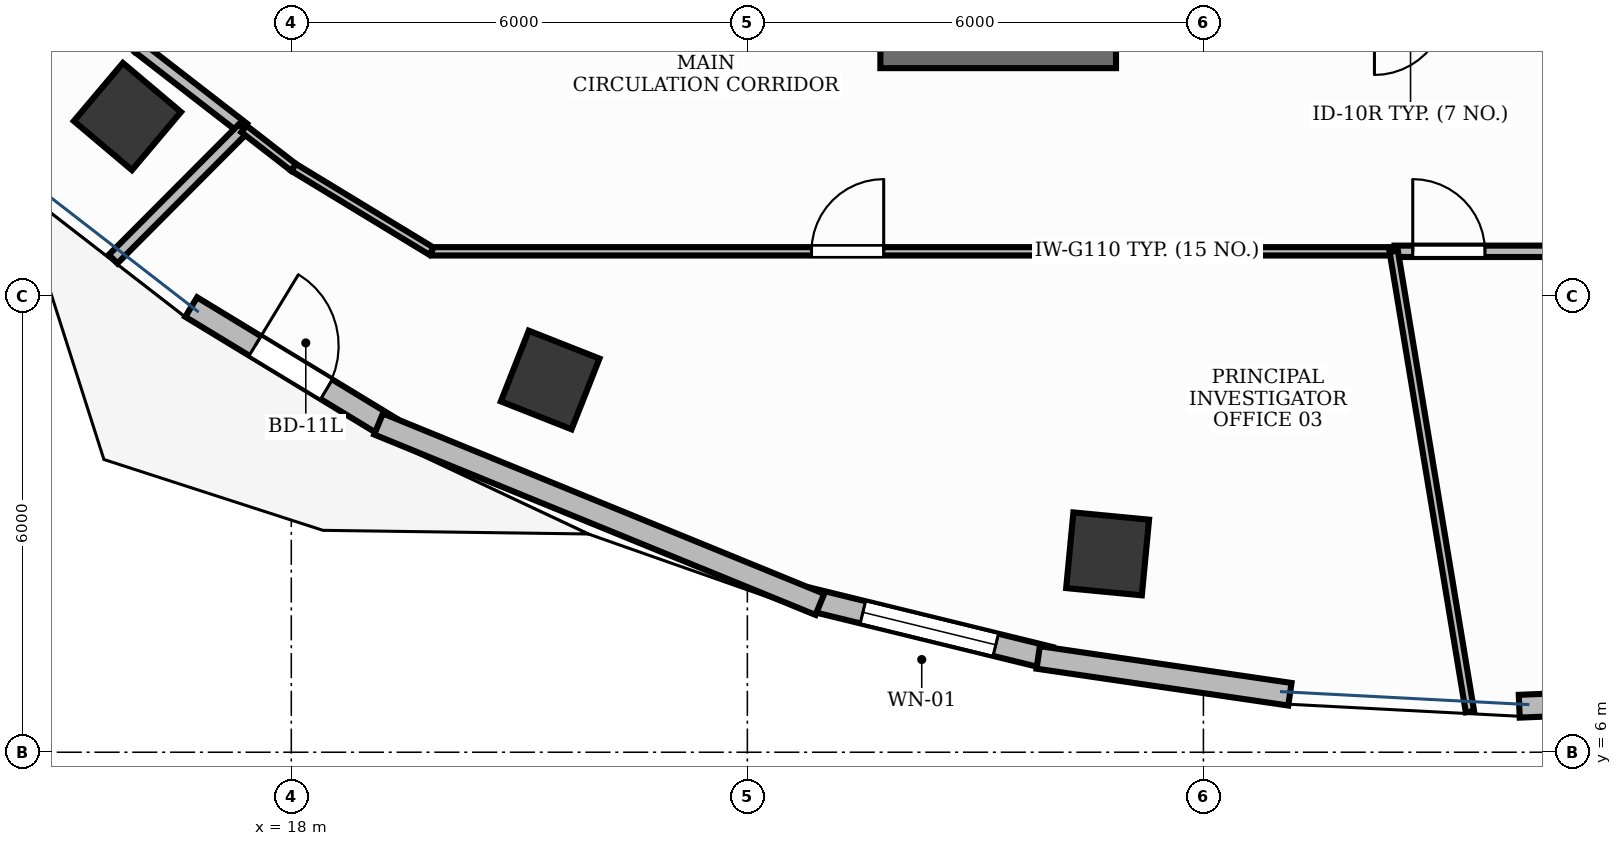
"""IFC4 building model, lengths in metres.
Left out: names, types, materials, properties, quantities, classifications, styles, units other than length and angle.
Written with IfcOpenShell. Run it as: python <this file> out.ifc"""

import sys

from ifc_helpers import new_model, si_unit, direction, frame, frame_2d, origin, origin_2d, place, context, subcontext, project, spatial, rectangle, extrude, element, fill, save


model = new_model("IFC4")
c1 = context("Model", 3, precision=1e-05, world=origin(), true_north=direction((0.0, 1.0)))
c2 = subcontext(c1, "Body", "Model", "MODEL_VIEW")
j1 = project(units=[si_unit("LENGTHUNIT", "METRE"), si_unit("PLANEANGLEUNIT", "RADIAN")], contexts=[c1])
p1 = place(None, origin())
s1 = spatial("IfcSite", under=j1, at=p1, CompositionType="ELEMENT")
p2 = place(p1, origin())
s2 = spatial("IfcBuilding", under=s1, at=p2, CompositionType="ELEMENT")
p3 = place(p2, frame((0.0, 0.0, 187.8)))
s3 = spatial("IfcBuildingStorey", under=s2, at=p3, CompositionType="ELEMENT", Elevation=187.8)
p4 = place(p3, frame((25.75, 15.2, 0.0), z_axis=(0.0, 0.0, 1.0), x_axis=(1.0, 0.0, 0.0)))
e1 = element("IfcWall", 1, at=p4, inside=s3, PredefinedType="SHEAR", context=c2, shape_type="SweptSolid", body=[
    extrude(rectangle(XDim=3.1, YDim=0.4, at=frame_2d((1.55, 0.0))), origin(), (0.0, 0.0, 1.0), 3.9),
])
for number, where, z_axis, x_axis in (
    (2, (15.844, 14.363, -0.0), (0.0, 0.0, 1.0), (-0.764, 0.645, 0.0)),
    (3, (21.406, 10.897, -0.0), (0.0, 0.0, 1.0), (-0.93, 0.367, 0.0)),
    (4, (28.74, 8.61, -0.0), (0.0, 0.0, 1.0), (-0.995, 0.095, 0.0)),
):
    element("IfcColumn", number, at=place(p3, frame(where, z_axis=z_axis, x_axis=x_axis)), inside=s3, PredefinedType="COLUMN", context=c2, shape_type="SweptSolid", body=[
        extrude(rectangle(XDim=1.0, YDim=1.0, at=origin_2d()), origin(), (0.0, 0.0, 1.0), 3.901),
    ])
p5 = place(p3, frame((16.683, 11.856, 0.0), z_axis=(0.0, 0.0, 1.0), x_axis=(0.85455658592, -0.519358297769, 0.0)))
e5 = element("IfcWall", 5, at=p5, inside=s3, PredefinedType="STANDARD", context=c2, shape_type="SweptSolid", body=[
    extrude(rectangle(XDim=3.066, YDim=0.3, at=frame_2d((1.533, 0.0))), origin(), (0.0, 0.0, 1.0), 3.9),
])
p6 = place(p5, frame((0.983, 0.0, 0.0)))
e6 = element("IfcOpeningElement", 6, at=p6, cuts=e5, PredefinedType="OPENING", context=c2, shape_type="SweptSolid", body=[
    extrude(rectangle(XDim=1.1, YDim=2.15, at=frame_2d((0.55, 1.075))), frame((0.0, 0.165, 0.0), z_axis=(0.0, -1.0, 0.0), x_axis=(1.0, 0.0, 0.0)), (0.0, 0.0, 1.0), 0.33),
])
p7 = place(p3, frame((24.807, 8.016, 0.0), z_axis=(0.0, 0.0, 1.0), x_axis=(0.971312804689, -0.237805457142, 0.0)))
e7 = element("IfcWall", 7, at=p7, inside=s3, PredefinedType="STANDARD", context=c2, shape_type="SweptSolid", body=[
    extrude(rectangle(XDim=3.269, YDim=0.3, at=frame_2d((1.634, 0.0))), origin(), (0.0, 0.0, 1.0), 3.9),
])
p8 = place(p7, frame((0.734, 0.0, 0.9)))
e8 = element("IfcOpeningElement", 8, at=p8, cuts=e7, PredefinedType="OPENING", context=c2, shape_type="SweptSolid", body=[
    extrude(rectangle(XDim=1.8, YDim=2.1, at=frame_2d((0.9, 1.05))), frame((0.0, 0.165, 0.0), z_axis=(0.0, -1.0, 0.0), x_axis=(1.0, 0.0, 0.0)), (0.0, 0.0, 1.0), 0.33),
])
p9 = place(p3, frame((19.148, 10.318, 0.0), z_axis=(0.0, 0.0, 1.0), x_axis=(0.925664098805, -0.378346370648, 0.0)))
e9 = element("IfcWall", 9, at=p9, inside=s3, PredefinedType="STANDARD", context=c2, shape_type="SweptSolid", body=[
    extrude(rectangle(XDim=6.272, YDim=0.3, at=frame_2d((3.136, 0.0))), origin(), (0.0, 0.0, 1.0), 3.47),
])
p10 = place(p3, frame((27.826, 7.247, 0.0), z_axis=(0.0, 0.0, 1.0), x_axis=(0.98945927954, -0.144811374319, 0.0)))
e10 = element("IfcWall", 10, at=p10, inside=s3, PredefinedType="STANDARD", context=c2, shape_type="SweptSolid", body=[
    extrude(rectangle(XDim=3.346, YDim=0.3, at=frame_2d((1.673, 0.0))), origin(), (0.0, 0.0, 1.0), 3.47),
])
p11 = place(p3, frame((34.155, 6.605, 0.0), z_axis=(0.0, 0.0, 1.0), x_axis=(0.999190386434, 0.040231475948, 0.0)))
e11 = element("IfcWall", 11, at=p11, inside=s3, PredefinedType="STANDARD", context=c2, shape_type="SweptSolid", body=[
    extrude(rectangle(XDim=3.368, YDim=0.3, at=frame_2d((1.684, 0.0))), origin(), (0.0, 0.0, 1.0), 3.9),
])
p12 = place(p3, frame((19.85, 12.59, 0.0), z_axis=(0.0, 0.0, 1.0), x_axis=(1.0, 0.0, 0.0)))
e12 = element("IfcWall", 12, at=p12, inside=s3, PredefinedType="MOVABLE", context=c2, shape_type="SweptSolid", body=[
    extrude(rectangle(XDim=12.654, YDim=0.11, at=frame_2d((6.327, 0.0))), origin(), (0.0, 0.0, 1.0), 2.91),
])
p13 = place(p12, frame((4.994, 0.0, 0.0)))
e13 = element("IfcOpeningElement", 13, at=p13, cuts=e12, PredefinedType="OPENING", context=c2, shape_type="SweptSolid", body=[
    extrude(rectangle(XDim=0.95, YDim=2.15, at=frame_2d((0.475, 1.075))), frame((0.0, 0.07, 0.0), z_axis=(0.0, -1.0, 0.0), x_axis=(1.0, 0.0, 0.0)), (0.0, 0.0, 1.0), 0.14),
])
p14 = place(p3, frame((32.514, 12.59, 0.0), z_axis=(0.0, 0.0, 1.0), x_axis=(1.0, 0.0, 0.0)))
e14 = element("IfcWall", 14, at=p14, inside=s3, PredefinedType="PARTITIONING", context=c2, shape_type="SweptSolid", body=[
    extrude(rectangle(XDim=11.986, YDim=0.15, at=frame_2d((5.993, 0.0))), origin(), (0.0, 0.0, 1.0), 2.91),
])
p15 = place(p14, frame((0.24, 0.0, 0.0)))
e15 = element("IfcOpeningElement", 15, at=p15, cuts=e14, PredefinedType="OPENING", context=c2, shape_type="SweptSolid", body=[
    extrude(rectangle(XDim=0.95, YDim=2.15, at=frame_2d((0.475, 1.075))), frame((0.0, 0.09, 0.0), z_axis=(0.0, -1.0, 0.0), x_axis=(1.0, 0.0, 0.0)), (0.0, 0.0, 1.0), 0.18),
])
p16 = place(p3, frame((15.995, 15.271, 0.0), z_axis=(0.0, 0.0, 1.0), x_axis=(0.790583329936, -0.612354471224, 0.0)))
e16 = element("IfcWall", 16, at=p16, inside=s3, PredefinedType="PARTITIONING", context=c2, shape_type="SweptSolid", body=[
    extrude(rectangle(XDim=1.738, YDim=0.16, at=frame_2d((0.869, 0.0))), origin(), (0.0, 0.0, 1.0), 2.91),
])
p17 = place(p3, frame((17.369, 14.207, 0.0), z_axis=(0.0, 0.0, 1.0), x_axis=(-0.705948871301, -0.708262798056, 0.0)))
e17 = element("IfcWall", 17, at=p17, inside=s3, PredefinedType="PARTITIONING", context=c2, shape_type="SweptSolid", body=[
    extrude(rectangle(XDim=2.427, YDim=0.16, at=frame_2d((1.213, 0.0))), origin(), (0.0, 0.0, 1.0), 2.91),
])
p18 = place(p3, frame((17.377, 14.2, 0.0), z_axis=(0.0, 0.0, 1.0), x_axis=(0.790511553124, -0.612447127822, 0.0)))
e18 = element("IfcWall", 18, at=p18, inside=s3, PredefinedType="MOVABLE", context=c2, shape_type="SweptSolid", body=[
    extrude(rectangle(XDim=0.827, YDim=0.11, at=frame_2d((0.413, 0.0))), origin(), (0.0, 0.0, 1.0), 2.91),
])
p19 = place(p3, frame((18.031, 13.694, 0.0), z_axis=(0.0, 0.0, 1.0), x_axis=(0.85454497186, -0.51937740716, 0.0)))
e19 = element("IfcWall", 19, at=p19, inside=s3, PredefinedType="MOVABLE", context=c2, shape_type="SweptSolid", body=[
    extrude(rectangle(XDim=2.122, YDim=0.11, at=frame_2d((1.061, 0.0))), origin(), (0.0, 0.0, 1.0), 2.91),
])
p20 = place(p3, frame((32.504, 12.59, 0.0), z_axis=(0.0, 0.0, 1.0), x_axis=(0.163321963264, -0.986572823625, 0.0)))
e20 = element("IfcWall", 20, at=p20, inside=s3, PredefinedType="MOVABLE", context=c2, shape_type="SweptSolid", body=[
    extrude(rectangle(XDim=6.139, YDim=0.11, at=frame_2d((3.07, 0.0))), origin(), (0.0, 0.0, 1.0), 2.91),
])
p21 = place(p6, origin())
e21 = element("IfcDoor", 21, at=p21, inside=s3, OperationType="SINGLE_SWING_LEFT", PredefinedType="DOOR", context=c2, shape_type="SweptSolid", body=[
    extrude(rectangle(XDim=1.1, YDim=2.15, at=frame_2d((0.55, 1.075))), frame((0.0, 0.025, 0.0), z_axis=(0.0, -1.0, 0.0), x_axis=(1.0, 0.0, 0.0)), (0.0, 0.0, 1.0), 0.05),
])
fill(e6, e21)
p22 = place(p8, origin())
e22 = element("IfcWindow", 22, at=p22, inside=s3, PartitioningType="SINGLE_PANEL", PredefinedType="WINDOW", context=c2, shape_type="SweptSolid", body=[
    extrude(rectangle(XDim=1.8, YDim=2.1, at=frame_2d((0.9, 1.05))), frame((0.0, 0.03, 0.0), z_axis=(0.0, -1.0, 0.0), x_axis=(1.0, 0.0, 0.0)), (0.0, 0.0, 1.0), 0.06),
])
fill(e8, e22)
p23 = place(p13, origin())
e23 = element("IfcDoor", 23, at=p23, inside=s3, OperationType="SINGLE_SWING_RIGHT", PredefinedType="DOOR", context=c2, shape_type="SweptSolid", body=[
    extrude(rectangle(XDim=0.95, YDim=2.15, at=frame_2d((0.475, 1.075))), frame((0.0, 0.025, 0.0), z_axis=(0.0, -1.0, 0.0), x_axis=(1.0, 0.0, 0.0)), (0.0, 0.0, 1.0), 0.05),
])
fill(e13, e23)
p24 = place(p15, origin())
e24 = element("IfcDoor", 24, at=p24, inside=s3, OperationType="SINGLE_SWING_LEFT", PredefinedType="DOOR", context=c2, shape_type="SweptSolid", body=[
    extrude(rectangle(XDim=0.95, YDim=2.15, at=frame_2d((0.475, 1.075))), frame((0.0, 0.025, 0.0), z_axis=(0.0, -1.0, 0.0), x_axis=(1.0, 0.0, 0.0)), (0.0, 0.0, 1.0), 0.05),
])
fill(e15, e24)
save(model, sys.argv[1])
